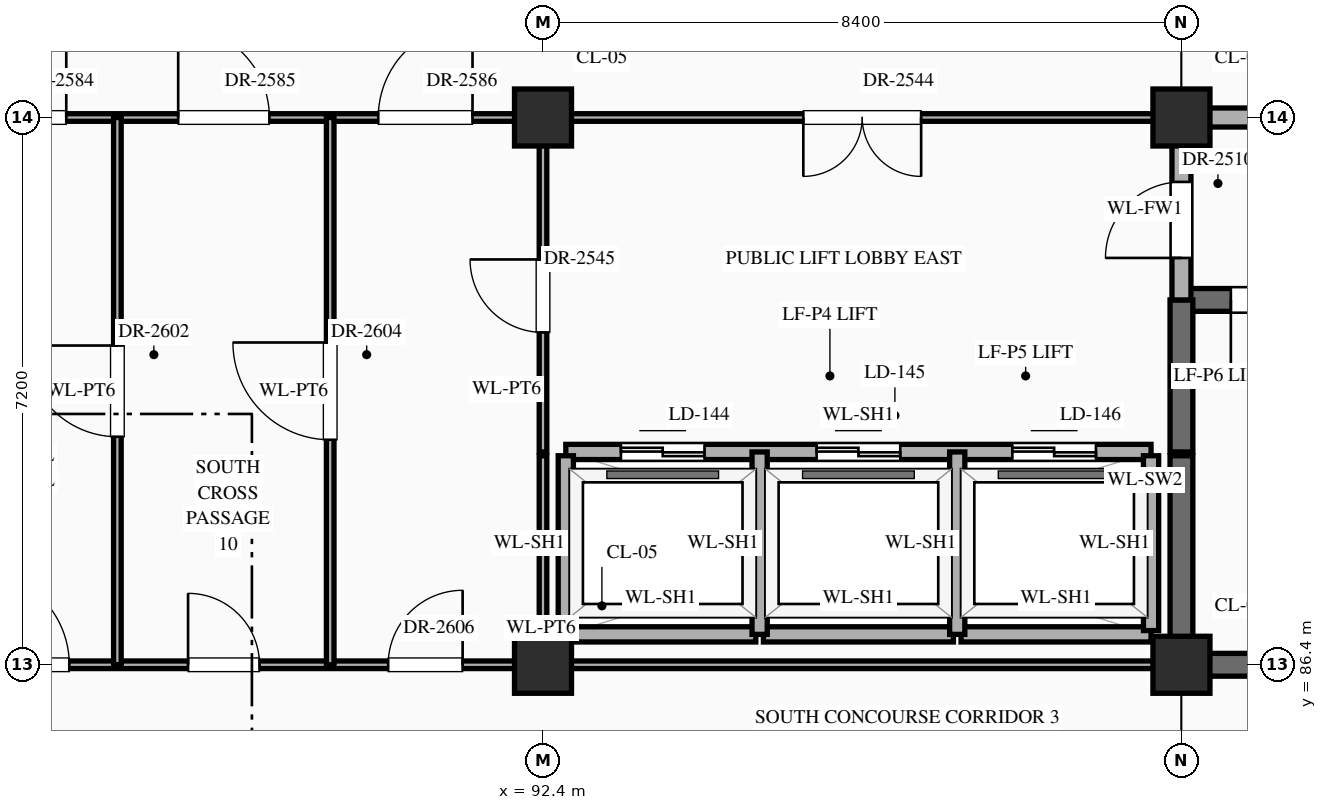
"""IFC4 building model, lengths in metres.
Left out: names, types, materials, properties, quantities, classifications, styles, units other than length and angle.
Written with IfcOpenShell. Run it as: python <this file> out.ifc"""

import sys

from ifc_helpers import new_model, si_unit, direction, frame, frame_2d, origin, origin_2d, place, context, subcontext, project, spatial, rectangle, extrude, element, fill, save


model = new_model("IFC4")
c1 = context("Model", 3, precision=1e-05, world=origin(), true_north=direction((0.0, 1.0)))
c2 = subcontext(c1, "Body", "Model", "MODEL_VIEW")
j1 = project(units=[si_unit("LENGTHUNIT", "METRE"), si_unit("PLANEANGLEUNIT", "RADIAN")], contexts=[c1])
p1 = place(None, origin())
s1 = spatial("IfcSite", under=j1, at=p1, CompositionType="ELEMENT")
p2 = place(p1, origin())
s2 = spatial("IfcBuilding", under=s1, at=p2, CompositionType="ELEMENT")
p3 = place(p2, frame((0.0, 0.0, 35.1)))
s3 = spatial("IfcBuildingStorey", under=s2, at=p3, CompositionType="ELEMENT", Elevation=35.1)
for number, where, z_axis, x_axis in (
    (1, (92.4, 86.4, 0.0), (0.0, 0.0, 1.0), (1.0, 0.0, 0.0)),
    (2, (92.4, 93.6, 0.0), (0.0, 0.0, 1.0), (1.0, 0.0, 0.0)),
    (3, (100.8, 86.4, 0.0), (0.0, 0.0, 1.0), (1.0, 0.0, 0.0)),
    (4, (100.8, 93.6, 0.0), (0.0, 0.0, 1.0), (1.0, 0.0, 0.0)),
):
    element("IfcColumn", number, at=place(p3, frame(where, z_axis=z_axis, x_axis=x_axis)), inside=s3, PredefinedType="COLUMN", context=c2, shape_type="SweptSolid", body=[
        extrude(rectangle(XDim=0.75, YDim=0.75, at=origin_2d()), origin(), (0.0, 0.0, 1.0), 4.2),
    ])
p4 = place(p3, frame((84.0, 86.4, 0.0), z_axis=(0.0, 0.0, 1.0), x_axis=(1.0, 0.0, 0.0)))
e5 = element("IfcWall", 5, at=p4, inside=s3, PredefinedType="STANDARD", context=c2, shape_type="SweptSolid", body=[
    extrude(rectangle(XDim=8.4, YDim=0.1, at=frame_2d((4.2, 0.0))), origin(), (0.0, 0.0, 1.0), 3.1),
])
p5 = place(p4, frame((0.927, 0.0, 0.0)))
e6 = element("IfcOpeningElement", 6, at=p5, cuts=e5, PredefinedType="OPENING", context=c2, shape_type="SweptSolid", body=[
    extrude(rectangle(XDim=1.24, YDim=2.3, at=frame_2d((0.62, 1.15))), frame((0.0, 0.062, 0.0), z_axis=(0.0, -1.0, 0.0), x_axis=(1.0, 0.0, 0.0)), (0.0, 0.0, 1.0), 0.124),
])
p6 = place(p4, frame((3.73, 0.0, 0.0)))
e7 = element("IfcOpeningElement", 7, at=p6, cuts=e5, PredefinedType="OPENING", context=c2, shape_type="SweptSolid", body=[
    extrude(rectangle(XDim=0.94, YDim=2.3, at=frame_2d((0.47, 1.15))), frame((0.0, 0.062, 0.0), z_axis=(0.0, -1.0, 0.0), x_axis=(1.0, 0.0, 0.0)), (0.0, 0.0, 1.0), 0.124),
])
p7 = place(p4, frame((6.363, 0.0, 0.0)))
e8 = element("IfcOpeningElement", 8, at=p7, cuts=e5, PredefinedType="OPENING", context=c2, shape_type="SweptSolid", body=[
    extrude(rectangle(XDim=0.98, YDim=2.35, at=frame_2d((0.49, 1.175))), frame((0.0, 0.062, 0.0), z_axis=(0.0, -1.0, 0.0), x_axis=(1.0, 0.0, 0.0)), (0.0, 0.0, 1.0), 0.124),
])
p8 = place(p3, frame((92.45, 86.4, 0.0), z_axis=(0.0, 0.0, 1.0), x_axis=(1.0, 0.0, 0.0)))
e9 = element("IfcWall", 9, at=p8, inside=s3, PredefinedType="STANDARD", context=c2, shape_type="SweptSolid", body=[
    extrude(rectangle(XDim=8.3, YDim=0.1, at=frame_2d((4.15, 0.0))), origin(), (0.0, 0.0, 1.0), 3.1),
])
p9 = place(p3, frame((100.8, 86.4, 0.0), z_axis=(0.0, 0.0, 1.0), x_axis=(1.0, 0.0, 0.0)))
e10 = element("IfcWall", 10, at=p9, inside=s3, PredefinedType="SHEAR", context=c2, shape_type="SweptSolid", body=[
    extrude(rectangle(XDim=8.4, YDim=0.3, at=frame_2d((4.2, 0.0))), origin(), (0.0, 0.0, 1.0), 3.95),
])
for number, where, z_axis, x_axis in (
    (11, (92.7, 86.8, 0.0), (0.0, 0.0, 1.0), (1.0, 0.0, 0.0)),
    (12, (95.3, 86.8, 0.0), (0.0, 0.0, 1.0), (1.0, 0.0, 0.0)),
    (13, (97.9, 86.8, 0.0), (0.0, 0.0, 1.0), (1.0, 0.0, 0.0)),
):
    element("IfcWall", number, at=place(p3, frame(where, z_axis=z_axis, x_axis=x_axis)), inside=s3, PredefinedType="STANDARD", context=c2, shape_type="SweptSolid", body=[
        extrude(rectangle(XDim=2.5, YDim=0.2, at=frame_2d((1.25, 0.0))), origin(), (0.0, 0.0, 1.0), 3.95),
    ])
p10 = place(p3, frame((92.7, 89.2, 0.0), z_axis=(0.0, 0.0, 1.0), x_axis=(1.0, 0.0, 0.0)))
e14 = element("IfcWall", 14, at=p10, inside=s3, PredefinedType="STANDARD", context=c2, shape_type="SweptSolid", body=[
    extrude(rectangle(XDim=7.7, YDim=0.2, at=frame_2d((3.85, 0.0))), origin(), (0.0, 0.0, 1.0), 3.95),
])
p11 = place(p10, frame((0.725, 0.0, 0.0)))
e15 = element("IfcOpeningElement", 15, at=p11, cuts=e14, PredefinedType="OPENING", context=c2, shape_type="SweptSolid", body=[
    extrude(rectangle(XDim=1.1, YDim=2.15, at=frame_2d((0.55, 1.075))), frame((0.0, 0.112, 0.0), z_axis=(0.0, -1.0, 0.0), x_axis=(1.0, 0.0, 0.0)), (0.0, 0.0, 1.0), 0.224),
])
p12 = place(p10, frame((3.3, 0.0, 0.0)))
e16 = element("IfcOpeningElement", 16, at=p12, cuts=e14, PredefinedType="OPENING", context=c2, shape_type="SweptSolid", body=[
    extrude(rectangle(XDim=1.1, YDim=2.15, at=frame_2d((0.55, 1.075))), frame((0.0, 0.112, 0.0), z_axis=(0.0, -1.0, 0.0), x_axis=(1.0, 0.0, 0.0)), (0.0, 0.0, 1.0), 0.224),
])
p13 = place(p10, frame((5.875, 0.0, 0.0)))
e17 = element("IfcOpeningElement", 17, at=p13, cuts=e14, PredefinedType="OPENING", context=c2, shape_type="SweptSolid", body=[
    extrude(rectangle(XDim=1.1, YDim=2.15, at=frame_2d((0.55, 1.075))), frame((0.0, 0.112, 0.0), z_axis=(0.0, -1.0, 0.0), x_axis=(1.0, 0.0, 0.0)), (0.0, 0.0, 1.0), 0.224),
])
p14 = place(p3, frame((100.8, 91.2, 0.0), z_axis=(0.0, 0.0, 1.0), x_axis=(1.0, 0.0, 0.0)))
e18 = element("IfcWall", 18, at=p14, inside=s3, PredefinedType="SHEAR", context=c2, shape_type="SweptSolid", body=[
    extrude(rectangle(XDim=8.4, YDim=0.3, at=frame_2d((4.2, 0.0))), origin(), (0.0, 0.0, 1.0), 3.95),
])
p15 = place(p14, frame((0.65, 0.0, 0.0)))
e19 = element("IfcOpeningElement", 19, at=p15, cuts=e18, PredefinedType="OPENING", context=c2, shape_type="SweptSolid", body=[
    extrude(rectangle(XDim=1.1, YDim=2.2, at=frame_2d((0.55, 1.1))), frame((0.0, 0.162, 0.0), z_axis=(0.0, -1.0, 0.0), x_axis=(1.0, 0.0, 0.0)), (0.0, 0.0, 1.0), 0.324),
])
p16 = place(p3, frame((67.2, 93.6, 0.0), z_axis=(0.0, 0.0, 1.0), x_axis=(1.0, 0.0, 0.0)))
e20 = element("IfcWall", 20, at=p16, inside=s3, PredefinedType="STANDARD", context=c2, shape_type="SweptSolid", body=[
    extrude(rectangle(XDim=33.6, YDim=0.1, at=frame_2d((16.8, 0.0))), origin(), (0.0, 0.0, 1.0), 3.1),
])
p17 = place(p16, frame((3.375, 0.0, 0.0)))
e21 = element("IfcOpeningElement", 21, at=p17, cuts=e20, PredefinedType="OPENING", context=c2, shape_type="SweptSolid", body=[
    extrude(rectangle(XDim=1.65, YDim=2.4, at=frame_2d((0.825, 1.2))), frame((0.0, 0.062, 0.0), z_axis=(0.0, -1.0, 0.0), x_axis=(1.0, 0.0, 0.0)), (0.0, 0.0, 1.0), 0.124),
])
p18 = place(p16, frame((28.625, 0.0, 0.0)))
e22 = element("IfcOpeningElement", 22, at=p18, cuts=e20, PredefinedType="OPENING", context=c2, shape_type="SweptSolid", body=[
    extrude(rectangle(XDim=1.55, YDim=2.35, at=frame_2d((0.775, 1.175))), frame((0.0, 0.062, 0.0), z_axis=(0.0, -1.0, 0.0), x_axis=(1.0, 0.0, 0.0)), (0.0, 0.0, 1.0), 0.124),
])
p19 = place(p16, frame((11.775, 0.0, 0.0)))
e23 = element("IfcOpeningElement", 23, at=p19, cuts=e20, PredefinedType="OPENING", context=c2, shape_type="SweptSolid", body=[
    extrude(rectangle(XDim=1.65, YDim=2.4, at=frame_2d((0.825, 1.2))), frame((0.0, 0.062, 0.0), z_axis=(0.0, -1.0, 0.0), x_axis=(1.0, 0.0, 0.0)), (0.0, 0.0, 1.0), 0.124),
])
p20 = place(p16, frame((17.768, 0.0, 0.0)))
e24 = element("IfcOpeningElement", 24, at=p20, cuts=e20, PredefinedType="OPENING", context=c2, shape_type="SweptSolid", body=[
    extrude(rectangle(XDim=1.16, YDim=2.3, at=frame_2d((0.58, 1.15))), frame((0.0, 0.062, 0.0), z_axis=(0.0, -1.0, 0.0), x_axis=(1.0, 0.0, 0.0)), (0.0, 0.0, 1.0), 0.124),
])
p21 = place(p16, frame((20.4, 0.0, 0.0)))
e25 = element("IfcOpeningElement", 25, at=p21, cuts=e20, PredefinedType="OPENING", context=c2, shape_type="SweptSolid", body=[
    extrude(rectangle(XDim=1.2, YDim=2.35, at=frame_2d((0.6, 1.175))), frame((0.0, 0.062, 0.0), z_axis=(0.0, -1.0, 0.0), x_axis=(1.0, 0.0, 0.0)), (0.0, 0.0, 1.0), 0.124),
])
p22 = place(p16, frame((23.032, 0.0, 0.0)))
e26 = element("IfcOpeningElement", 26, at=p22, cuts=e20, PredefinedType="OPENING", context=c2, shape_type="SweptSolid", body=[
    extrude(rectangle(XDim=1.24, YDim=2.3, at=frame_2d((0.62, 1.15))), frame((0.0, 0.062, 0.0), z_axis=(0.0, -1.0, 0.0), x_axis=(1.0, 0.0, 0.0)), (0.0, 0.0, 1.0), 0.124),
])
p23 = place(p3, frame((100.8, 93.6, 0.0), z_axis=(0.0, 0.0, 1.0), x_axis=(1.0, 0.0, 0.0)))
e27 = element("IfcWall", 27, at=p23, inside=s3, PredefinedType="STANDARD", context=c2, shape_type="SweptSolid", body=[
    extrude(rectangle(XDim=8.4, YDim=0.25, at=frame_2d((4.2, 0.0))), origin(), (0.0, 0.0, 1.0), 3.1),
])
p24 = place(p23, frame((3.2, 0.0, 0.0)))
e28 = element("IfcOpeningElement", 28, at=p24, cuts=e27, PredefinedType="OPENING", context=c2, shape_type="SweptSolid", body=[
    extrude(rectangle(XDim=2.0, YDim=2.4, at=frame_2d((1.0, 1.2))), frame((0.0, 0.137, 0.0), z_axis=(0.0, -1.0, 0.0), x_axis=(1.0, 0.0, 0.0)), (0.0, 0.0, 1.0), 0.274),
])
p25 = place(p3, frame((86.8, 86.4, 0.0), z_axis=(0.0, 0.0, 1.0), x_axis=(0.0, 1.0, 0.0)))
e29 = element("IfcWall", 29, at=p25, inside=s3, PredefinedType="STANDARD", context=c2, shape_type="SweptSolid", body=[
    extrude(rectangle(XDim=7.2, YDim=0.1, at=frame_2d((3.6, 0.0))), origin(), (0.0, 0.0, 1.0), 3.95),
])
p26 = place(p25, frame((3.0, 0.0, 0.0)))
e30 = element("IfcOpeningElement", 30, at=p26, cuts=e29, PredefinedType="OPENING", context=c2, shape_type="SweptSolid", body=[
    extrude(rectangle(XDim=1.2, YDim=2.35, at=frame_2d((0.6, 1.175))), frame((0.0, 0.062, 0.0), z_axis=(0.0, -1.0, 0.0), x_axis=(1.0, 0.0, 0.0)), (0.0, 0.0, 1.0), 0.124),
])
p27 = place(p3, frame((89.6, 86.4, 0.0), z_axis=(0.0, 0.0, 1.0), x_axis=(0.0, 1.0, 0.0)))
e31 = element("IfcWall", 31, at=p27, inside=s3, PredefinedType="STANDARD", context=c2, shape_type="SweptSolid", body=[
    extrude(rectangle(XDim=7.2, YDim=0.1, at=frame_2d((3.6, 0.0))), origin(), (0.0, 0.0, 1.0), 3.95),
])
p28 = place(p27, frame((2.96, 0.0, 0.0)))
e32 = element("IfcOpeningElement", 32, at=p28, cuts=e31, PredefinedType="OPENING", context=c2, shape_type="SweptSolid", body=[
    extrude(rectangle(XDim=1.28, YDim=2.35, at=frame_2d((0.64, 1.175))), frame((0.0, 0.062, 0.0), z_axis=(0.0, -1.0, 0.0), x_axis=(1.0, 0.0, 0.0)), (0.0, 0.0, 1.0), 0.124),
])
p29 = place(p3, frame((92.4, 86.45, 0.0), z_axis=(0.0, 0.0, 1.0), x_axis=(0.0, 1.0, 0.0)))
e33 = element("IfcWall", 33, at=p29, inside=s3, PredefinedType="STANDARD", context=c2, shape_type="SweptSolid", body=[
    extrude(rectangle(XDim=2.7, YDim=0.1, at=frame_2d((1.35, 0.0))), origin(), (0.0, 0.0, 1.0), 3.2),
])
p30 = place(p3, frame((92.4, 89.2, 0.0), z_axis=(0.0, 0.0, 1.0), x_axis=(0.0, 1.0, 0.0)))
e34 = element("IfcWall", 34, at=p30, inside=s3, PredefinedType="STANDARD", context=c2, shape_type="SweptSolid", body=[
    extrude(rectangle(XDim=4.4, YDim=0.1, at=frame_2d((2.2, 0.0))), origin(), (0.0, 0.0, 1.0), 3.2),
])
p31 = place(p30, frame((1.573, 0.0, 0.0)))
e35 = element("IfcOpeningElement", 35, at=p31, cuts=e34, PredefinedType="OPENING", context=c2, shape_type="SweptSolid", body=[
    extrude(rectangle(XDim=0.96, YDim=2.2, at=frame_2d((0.48, 1.1))), frame((0.0, 0.062, 0.0), z_axis=(0.0, -1.0, 0.0), x_axis=(1.0, 0.0, 0.0)), (0.0, 0.0, 1.0), 0.124),
])
p32 = place(p3, frame((92.7, 86.85, 0.0), z_axis=(0.0, 0.0, 1.0), x_axis=(0.0, 1.0, 0.0)))
e36 = element("IfcWall", 36, at=p32, inside=s3, PredefinedType="STANDARD", context=c2, shape_type="SweptSolid", body=[
    extrude(rectangle(XDim=2.3, YDim=0.2, at=frame_2d((1.15, 0.0))), origin(), (0.0, 0.0, 1.0), 3.95),
])
for number, where, z_axis, x_axis in (
    (37, (95.25, 86.8, 0.0), (0.0, 0.0, 1.0), (0.0, 1.0, 0.0)),
    (38, (97.85, 86.8, 0.0), (0.0, 0.0, 1.0), (0.0, 1.0, 0.0)),
):
    element("IfcWall", number, at=place(p3, frame(where, z_axis=z_axis, x_axis=x_axis)), inside=s3, PredefinedType="STANDARD", context=c2, shape_type="SweptSolid", body=[
        extrude(rectangle(XDim=2.4, YDim=0.2, at=frame_2d((1.2, 0.0))), origin(), (0.0, 0.0, 1.0), 3.95),
    ])
p33 = place(p3, frame((100.4, 86.85, 0.0), z_axis=(0.0, 0.0, 1.0), x_axis=(0.0, 1.0, 0.0)))
e39 = element("IfcWall", 39, at=p33, inside=s3, PredefinedType="STANDARD", context=c2, shape_type="SweptSolid", body=[
    extrude(rectangle(XDim=2.3, YDim=0.2, at=frame_2d((1.15, 0.0))), origin(), (0.0, 0.0, 1.0), 3.95),
])
p34 = place(p3, frame((100.8, 86.45, 0.0), z_axis=(0.0, 0.0, 1.0), x_axis=(0.0, 1.0, 0.0)))
e40 = element("IfcWall", 40, at=p34, inside=s3, PredefinedType="SHEAR", context=c2, shape_type="SweptSolid", body=[
    extrude(rectangle(XDim=2.7, YDim=0.3, at=frame_2d((1.35, 0.0))), origin(), (0.0, 0.0, 1.0), 3.95),
])
p35 = place(p3, frame((100.8, 89.2, 0.0), z_axis=(0.0, 0.0, 1.0), x_axis=(0.0, 1.0, 0.0)))
e41 = element("IfcWall", 41, at=p35, inside=s3, PredefinedType="SHEAR", context=c2, shape_type="SweptSolid", body=[
    extrude(rectangle(XDim=2.0, YDim=0.3, at=frame_2d((1.0, 0.0))), origin(), (0.0, 0.0, 1.0), 3.95),
])
p36 = place(p3, frame((100.8, 91.2, 0.0), z_axis=(0.0, 0.0, 1.0), x_axis=(0.0, 1.0, 0.0)))
e42 = element("IfcWall", 42, at=p36, inside=s3, PredefinedType="STANDARD", context=c2, shape_type="SweptSolid", body=[
    extrude(rectangle(XDim=2.4, YDim=0.25, at=frame_2d((1.2, 0.0))), origin(), (0.0, 0.0, 1.0), 3.2),
])
p37 = place(p36, frame((0.552, 0.0, 0.0)))
e43 = element("IfcOpeningElement", 43, at=p37, cuts=e42, PredefinedType="OPENING", context=c2, shape_type="SweptSolid", body=[
    extrude(rectangle(XDim=1.0, YDim=2.2, at=frame_2d((0.5, 1.1))), frame((0.0, 0.137, 0.0), z_axis=(0.0, -1.0, 0.0), x_axis=(1.0, 0.0, 0.0)), (0.0, 0.0, 1.0), 0.274),
])
p38 = place(p11, origin())
e44 = element("IfcDoor", 44, at=p38, inside=s3, OperationType="DOUBLE_DOOR_SLIDING", PredefinedType="DOOR", context=c2, shape_type="SweptSolid", body=[
    extrude(rectangle(XDim=1.1, YDim=2.15, at=frame_2d((0.55, 1.075))), frame((0.0, 0.025, 0.0), z_axis=(0.0, -1.0, 0.0), x_axis=(1.0, 0.0, 0.0)), (0.0, 0.0, 1.0), 0.05),
])
fill(e15, e44)
p39 = place(p12, origin())
e45 = element("IfcDoor", 45, at=p39, inside=s3, OperationType="DOUBLE_DOOR_SLIDING", PredefinedType="DOOR", context=c2, shape_type="SweptSolid", body=[
    extrude(rectangle(XDim=1.1, YDim=2.15, at=frame_2d((0.55, 1.075))), frame((0.0, 0.025, 0.0), z_axis=(0.0, -1.0, 0.0), x_axis=(1.0, 0.0, 0.0)), (0.0, 0.0, 1.0), 0.05),
])
fill(e16, e45)
p40 = place(p13, origin())
e46 = element("IfcDoor", 46, at=p40, inside=s3, OperationType="DOUBLE_DOOR_SLIDING", PredefinedType="DOOR", context=c2, shape_type="SweptSolid", body=[
    extrude(rectangle(XDim=1.1, YDim=2.15, at=frame_2d((0.55, 1.075))), frame((0.0, 0.025, 0.0), z_axis=(0.0, -1.0, 0.0), x_axis=(1.0, 0.0, 0.0)), (0.0, 0.0, 1.0), 0.05),
])
fill(e17, e46)
p41 = place(p15, frame((1.1, 0.0, 0.0), z_axis=(0.0, 0.0, 1.0), x_axis=(-1.0, 0.0, 0.0)))
e47 = element("IfcDoor", 47, at=p41, inside=s3, OperationType="SINGLE_SWING_RIGHT", PredefinedType="DOOR", context=c2, shape_type="SweptSolid", body=[
    extrude(rectangle(XDim=1.1, YDim=2.2, at=frame_2d((0.55, 1.1))), frame((0.0, 0.025, 0.0), z_axis=(0.0, -1.0, 0.0), x_axis=(1.0, 0.0, 0.0)), (0.0, 0.0, 1.0), 0.05),
])
fill(e19, e47)
p42 = place(p37, origin())
e48 = element("IfcDoor", 48, at=p42, inside=s3, OperationType="SINGLE_SWING_LEFT", PredefinedType="DOOR", context=c2, shape_type="SweptSolid", body=[
    extrude(rectangle(XDim=1.0, YDim=2.2, at=frame_2d((0.5, 1.1))), frame((0.0, 0.025, 0.0), z_axis=(0.0, -1.0, 0.0), x_axis=(1.0, 0.0, 0.0)), (0.0, 0.0, 1.0), 0.05),
])
fill(e43, e48)
p43 = place(p18, frame((1.55, 0.0, 0.0), z_axis=(0.0, 0.0, 1.0), x_axis=(-1.0, 0.0, 0.0)))
e49 = element("IfcDoor", 49, at=p43, inside=s3, OperationType="DOUBLE_DOOR_SINGLE_SWING", PredefinedType="DOOR", context=c2, shape_type="SweptSolid", body=[
    extrude(rectangle(XDim=1.55, YDim=2.35, at=frame_2d((0.775, 1.175))), frame((0.0, 0.025, 0.0), z_axis=(0.0, -1.0, 0.0), x_axis=(1.0, 0.0, 0.0)), (0.0, 0.0, 1.0), 0.05),
])
fill(e22, e49)
p44 = place(p31, origin())
e50 = element("IfcDoor", 50, at=p44, inside=s3, OperationType="SINGLE_SWING_RIGHT", PredefinedType="DOOR", context=c2, shape_type="SweptSolid", body=[
    extrude(rectangle(XDim=0.96, YDim=2.2, at=frame_2d((0.48, 1.1))), frame((0.0, 0.025, 0.0), z_axis=(0.0, -1.0, 0.0), x_axis=(1.0, 0.0, 0.0)), (0.0, 0.0, 1.0), 0.05),
])
fill(e35, e50)
p45 = place(p20, origin())
e51 = element("IfcDoor", 51, at=p45, inside=s3, OperationType="SINGLE_SWING_RIGHT", PredefinedType="DOOR", context=c2, shape_type="SweptSolid", body=[
    extrude(rectangle(XDim=1.16, YDim=2.3, at=frame_2d((0.58, 1.15))), frame((0.0, 0.025, 0.0), z_axis=(0.0, -1.0, 0.0), x_axis=(1.0, 0.0, 0.0)), (0.0, 0.0, 1.0), 0.05),
])
fill(e24, e51)
p46 = place(p21, origin())
e52 = element("IfcDoor", 52, at=p46, inside=s3, OperationType="SINGLE_SWING_LEFT", PredefinedType="DOOR", context=c2, shape_type="SweptSolid", body=[
    extrude(rectangle(XDim=1.2, YDim=2.35, at=frame_2d((0.6, 1.175))), frame((0.0, 0.025, 0.0), z_axis=(0.0, -1.0, 0.0), x_axis=(1.0, 0.0, 0.0)), (0.0, 0.0, 1.0), 0.05),
])
fill(e25, e52)
p47 = place(p22, origin())
e53 = element("IfcDoor", 53, at=p47, inside=s3, OperationType="SINGLE_SWING_RIGHT", PredefinedType="DOOR", context=c2, shape_type="SweptSolid", body=[
    extrude(rectangle(XDim=1.24, YDim=2.3, at=frame_2d((0.62, 1.15))), frame((0.0, 0.025, 0.0), z_axis=(0.0, -1.0, 0.0), x_axis=(1.0, 0.0, 0.0)), (0.0, 0.0, 1.0), 0.05),
])
fill(e26, e53)
p48 = place(p26, origin())
e54 = element("IfcDoor", 54, at=p48, inside=s3, OperationType="SINGLE_SWING_RIGHT", PredefinedType="DOOR", context=c2, shape_type="SweptSolid", body=[
    extrude(rectangle(XDim=1.2, YDim=2.35, at=frame_2d((0.6, 1.175))), frame((0.0, 0.025, 0.0), z_axis=(0.0, -1.0, 0.0), x_axis=(1.0, 0.0, 0.0)), (0.0, 0.0, 1.0), 0.05),
])
fill(e30, e54)
p49 = place(p5, origin())
e55 = element("IfcDoor", 55, at=p49, inside=s3, OperationType="SINGLE_SWING_LEFT", PredefinedType="DOOR", context=c2, shape_type="SweptSolid", body=[
    extrude(rectangle(XDim=1.24, YDim=2.3, at=frame_2d((0.62, 1.15))), frame((0.0, 0.025, 0.0), z_axis=(0.0, -1.0, 0.0), x_axis=(1.0, 0.0, 0.0)), (0.0, 0.0, 1.0), 0.05),
])
fill(e6, e55)
p50 = place(p28, origin())
e56 = element("IfcDoor", 56, at=p50, inside=s3, OperationType="SINGLE_SWING_RIGHT", PredefinedType="DOOR", context=c2, shape_type="SweptSolid", body=[
    extrude(rectangle(XDim=1.28, YDim=2.35, at=frame_2d((0.64, 1.175))), frame((0.0, 0.025, 0.0), z_axis=(0.0, -1.0, 0.0), x_axis=(1.0, 0.0, 0.0)), (0.0, 0.0, 1.0), 0.05),
])
fill(e32, e56)
p51 = place(p6, origin())
e57 = element("IfcDoor", 57, at=p51, inside=s3, OperationType="SINGLE_SWING_LEFT", PredefinedType="DOOR", context=c2, shape_type="SweptSolid", body=[
    extrude(rectangle(XDim=0.94, YDim=2.3, at=frame_2d((0.47, 1.15))), frame((0.0, 0.025, 0.0), z_axis=(0.0, -1.0, 0.0), x_axis=(1.0, 0.0, 0.0)), (0.0, 0.0, 1.0), 0.05),
])
fill(e7, e57)
p52 = place(p7, origin())
e58 = element("IfcDoor", 58, at=p52, inside=s3, OperationType="SINGLE_SWING_RIGHT", PredefinedType="DOOR", context=c2, shape_type="SweptSolid", body=[
    extrude(rectangle(XDim=0.98, YDim=2.35, at=frame_2d((0.49, 1.175))), frame((0.0, 0.025, 0.0), z_axis=(0.0, -1.0, 0.0), x_axis=(1.0, 0.0, 0.0)), (0.0, 0.0, 1.0), 0.05),
])
fill(e8, e58)
save(model, sys.argv[1])
